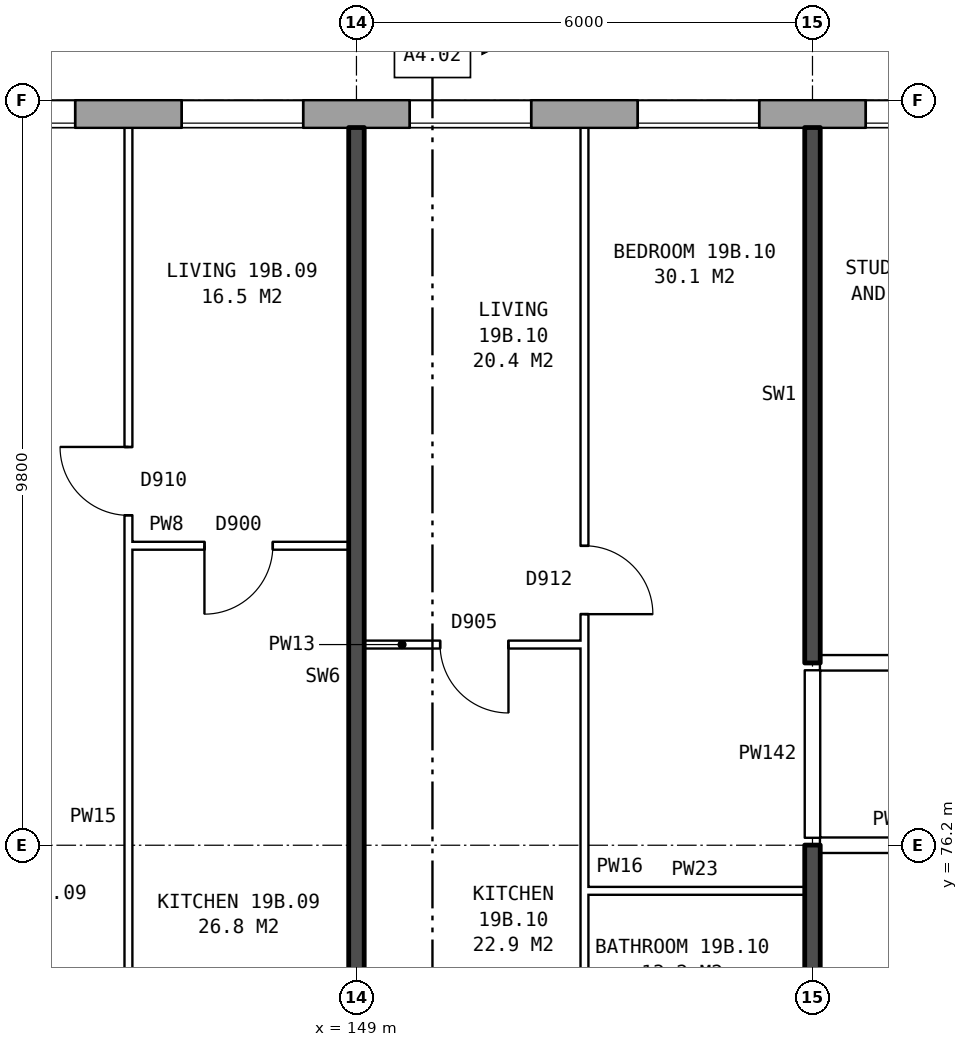
"""IFC4 building model, lengths in metres.
Left out: names, types, materials, properties, quantities, classifications, styles, units other than length and angle.
Written with IfcOpenShell. Run it as: python <this file> out.ifc"""

import sys

from ifc_helpers import new_model, si_unit, direction, frame, frame_2d, origin, place, context, subcontext, project, spatial, rectangle, extrude, element, fill, save


model = new_model("IFC4")
c1 = context("Model", 3, precision=1e-05, world=origin(), true_north=direction((0.0, 1.0)))
c2 = subcontext(c1, "Body", "Model", "MODEL_VIEW")
j1 = project(units=[si_unit("LENGTHUNIT", "METRE"), si_unit("PLANEANGLEUNIT", "RADIAN")], contexts=[c1])
p1 = place(None, origin())
s1 = spatial("IfcSite", under=j1, at=p1, CompositionType="ELEMENT")
p2 = place(p1, origin())
s2 = spatial("IfcBuilding", under=s1, at=p2, CompositionType="ELEMENT")
p3 = place(p2, frame((0.0, 0.0, 71.6)))
s3 = spatial("IfcBuildingStorey", under=s2, at=p3, CompositionType="ELEMENT", Elevation=71.6)
p4 = place(p3, frame((172.175, 85.82, 0.0), z_axis=(0.0, 0.0, 1.0), x_axis=(-1.0, 0.0, 0.0)))
e1 = element("IfcWall", 1, at=p4, inside=s3, PredefinedType="STANDARD", context=c2, shape_type="SweptSolid", body=[
    extrude(rectangle(XDim=38.101, YDim=0.36, at=frame_2d((19.05, 0.0))), origin(), (0.0, 0.0, 1.0), 2.85),
])
p5 = place(p4, frame((0.3, 0.0, 0.8)))
e2 = element("IfcOpeningElement", 2, at=p5, cuts=e1, PredefinedType="OPENING", context=c2, shape_type="SweptSolid", body=[
    extrude(rectangle(XDim=1.0, YDim=1.8, at=frame_2d((0.5, 0.9))), frame((0.0, 0.19, 0.0), z_axis=(0.0, -1.0, 0.0), x_axis=(1.0, 0.0, 0.0)), (0.0, 0.0, 1.0), 0.38),
])
p6 = place(p4, frame((5.875, 0.0, 0.8)))
e3 = element("IfcOpeningElement", 3, at=p6, cuts=e1, PredefinedType="OPENING", context=c2, shape_type="SweptSolid", body=[
    extrude(rectangle(XDim=1.6, YDim=1.8, at=frame_2d((0.8, 0.9))), frame((0.0, 0.19, 0.0), z_axis=(0.0, -1.0, 0.0), x_axis=(1.0, 0.0, 0.0)), (0.0, 0.0, 1.0), 0.38),
])
p7 = place(p4, frame((8.875, 0.0, 0.8)))
e4 = element("IfcOpeningElement", 4, at=p7, cuts=e1, PredefinedType="OPENING", context=c2, shape_type="SweptSolid", body=[
    extrude(rectangle(XDim=1.6, YDim=1.8, at=frame_2d((0.8, 0.9))), frame((0.0, 0.19, 0.0), z_axis=(0.0, -1.0, 0.0), x_axis=(1.0, 0.0, 0.0)), (0.0, 0.0, 1.0), 0.38),
])
p8 = place(p4, frame((11.875, 0.0, 0.8)))
e5 = element("IfcOpeningElement", 5, at=p8, cuts=e1, PredefinedType="OPENING", context=c2, shape_type="SweptSolid", body=[
    extrude(rectangle(XDim=1.6, YDim=1.8, at=frame_2d((0.8, 0.9))), frame((0.0, 0.19, 0.0), z_axis=(0.0, -1.0, 0.0), x_axis=(1.0, 0.0, 0.0)), (0.0, 0.0, 1.0), 0.38),
])
p9 = place(p4, frame((14.875, 0.0, 0.8)))
e6 = element("IfcOpeningElement", 6, at=p9, cuts=e1, PredefinedType="OPENING", context=c2, shape_type="SweptSolid", body=[
    extrude(rectangle(XDim=1.6, YDim=1.8, at=frame_2d((0.8, 0.9))), frame((0.0, 0.19, 0.0), z_axis=(0.0, -1.0, 0.0), x_axis=(1.0, 0.0, 0.0)), (0.0, 0.0, 1.0), 0.38),
])
p10 = place(p4, frame((17.875, 0.0, 0.8)))
e7 = element("IfcOpeningElement", 7, at=p10, cuts=e1, PredefinedType="OPENING", context=c2, shape_type="SweptSolid", body=[
    extrude(rectangle(XDim=1.6, YDim=1.8, at=frame_2d((0.8, 0.9))), frame((0.0, 0.19, 0.0), z_axis=(0.0, -1.0, 0.0), x_axis=(1.0, 0.0, 0.0)), (0.0, 0.0, 1.0), 0.38),
])
p11 = place(p4, frame((20.875, 0.0, 0.8)))
e8 = element("IfcOpeningElement", 8, at=p11, cuts=e1, PredefinedType="OPENING", context=c2, shape_type="SweptSolid", body=[
    extrude(rectangle(XDim=1.6, YDim=1.8, at=frame_2d((0.8, 0.9))), frame((0.0, 0.19, 0.0), z_axis=(0.0, -1.0, 0.0), x_axis=(1.0, 0.0, 0.0)), (0.0, 0.0, 1.0), 0.38),
])
p12 = place(p4, frame((23.875, 0.0, 0.8)))
e9 = element("IfcOpeningElement", 9, at=p12, cuts=e1, PredefinedType="OPENING", context=c2, shape_type="SweptSolid", body=[
    extrude(rectangle(XDim=1.6, YDim=1.8, at=frame_2d((0.8, 0.9))), frame((0.0, 0.19, 0.0), z_axis=(0.0, -1.0, 0.0), x_axis=(1.0, 0.0, 0.0)), (0.0, 0.0, 1.0), 0.38),
])
p13 = place(p4, frame((26.875, 0.0, 0.8)))
e10 = element("IfcOpeningElement", 10, at=p13, cuts=e1, PredefinedType="OPENING", context=c2, shape_type="SweptSolid", body=[
    extrude(rectangle(XDim=1.6, YDim=1.8, at=frame_2d((0.8, 0.9))), frame((0.0, 0.19, 0.0), z_axis=(0.0, -1.0, 0.0), x_axis=(1.0, 0.0, 0.0)), (0.0, 0.0, 1.0), 0.38),
])
p14 = place(p4, frame((29.875, 0.0, 0.8)))
e11 = element("IfcOpeningElement", 11, at=p14, cuts=e1, PredefinedType="OPENING", context=c2, shape_type="SweptSolid", body=[
    extrude(rectangle(XDim=1.6, YDim=1.8, at=frame_2d((0.8, 0.9))), frame((0.0, 0.19, 0.0), z_axis=(0.0, -1.0, 0.0), x_axis=(1.0, 0.0, 0.0)), (0.0, 0.0, 1.0), 0.38),
])
p15 = place(p4, frame((31.775, 0.0, 0.8)))
e12 = element("IfcOpeningElement", 12, at=p15, cuts=e1, PredefinedType="OPENING", context=c2, shape_type="SweptSolid", body=[
    extrude(rectangle(XDim=1.6, YDim=1.8, at=frame_2d((0.8, 0.9))), frame((0.0, 0.19, 0.0), z_axis=(0.0, -1.0, 0.0), x_axis=(1.0, 0.0, 0.0)), (0.0, 0.0, 1.0), 0.38),
])
p16 = place(p4, frame((35.775, 0.0, 1.7)))
e13 = element("IfcOpeningElement", 13, at=p16, cuts=e1, PredefinedType="OPENING", context=c2, shape_type="SweptSolid", body=[
    extrude(rectangle(XDim=0.6, YDim=0.9, at=frame_2d((0.3, 0.45))), frame((0.0, 0.19, 0.0), z_axis=(0.0, -1.0, 0.0), x_axis=(1.0, 0.0, 0.0)), (0.0, 0.0, 1.0), 0.38),
])
p17 = place(p4, frame((1.6, 0.0, 1.6)))
e14 = element("IfcOpeningElement", 14, at=p17, cuts=e1, PredefinedType="OPENING", context=c2, shape_type="SweptSolid", body=[
    extrude(rectangle(XDim=0.6, YDim=0.9, at=frame_2d((0.3, 0.45))), frame((0.0, 0.19, 0.0), z_axis=(0.0, -1.0, 0.0), x_axis=(1.0, 0.0, 0.0)), (0.0, 0.0, 1.0), 0.38),
])
p18 = place(p4, frame((3.5, 0.0, 0.8)))
e15 = element("IfcOpeningElement", 15, at=p18, cuts=e1, PredefinedType="OPENING", context=c2, shape_type="SweptSolid", body=[
    extrude(rectangle(XDim=1.4, YDim=0.9, at=frame_2d((0.7, 0.45))), frame((0.0, 0.19, 0.0), z_axis=(0.0, -1.0, 0.0), x_axis=(1.0, 0.0, 0.0)), (0.0, 0.0, 1.0), 0.38),
])
p19 = place(p4, frame((33.675, 0.0, 0.8)))
e16 = element("IfcOpeningElement", 16, at=p19, cuts=e1, PredefinedType="OPENING", context=c2, shape_type="SweptSolid", body=[
    extrude(rectangle(XDim=0.6, YDim=1.2, at=frame_2d((0.3, 0.6))), frame((0.0, 0.19, 0.0), z_axis=(0.0, -1.0, 0.0), x_axis=(1.0, 0.0, 0.0)), (0.0, 0.0, 1.0), 0.38),
])
p20 = place(p4, frame((36.675, 0.0, 0.8)))
e17 = element("IfcOpeningElement", 17, at=p20, cuts=e1, PredefinedType="OPENING", context=c2, shape_type="SweptSolid", body=[
    extrude(rectangle(XDim=1.0, YDim=1.8, at=frame_2d((0.5, 0.9))), frame((0.0, 0.19, 0.0), z_axis=(0.0, -1.0, 0.0), x_axis=(1.0, 0.0, 0.0)), (0.0, 0.0, 1.0), 0.38),
])
p21 = place(p3, frame((152.0, 75.6, 0.0), z_axis=(0.0, 0.0, 1.0), x_axis=(1.0, 0.0, 0.0)))
e18 = element("IfcWall", 18, at=p21, inside=s3, PredefinedType="PARTITIONING", context=c2, shape_type="SweptSolid", body=[
    extrude(rectangle(XDim=2.9, YDim=0.1, at=frame_2d((1.45, 0.0))), origin(), (0.0, 0.0, 1.0), 2.85),
])
p22 = place(p3, frame((155.1, 76.2, 0.0), z_axis=(0.0, 0.0, 1.0), x_axis=(1.0, 0.0, 0.0)))
e19 = element("IfcWall", 19, at=p22, inside=s3, PredefinedType="PARTITIONING", context=c2, shape_type="SweptSolid", body=[
    extrude(rectangle(XDim=2.14, YDim=0.2, at=frame_2d((1.07, 0.0))), origin(), (0.0, 0.0, 1.0), 2.85),
])
p23 = place(p3, frame((155.1, 78.6, 0.0), z_axis=(0.0, 0.0, 1.0), x_axis=(1.0, 0.0, 0.0)))
e20 = element("IfcWall", 20, at=p23, inside=s3, PredefinedType="PARTITIONING", context=c2, shape_type="SweptSolid", body=[
    extrude(rectangle(XDim=19.79, YDim=0.2, at=frame_2d((9.895, 0.0))), origin(), (0.0, 0.0, 1.0), 2.85),
])
p24 = place(p23, frame((1.45, 0.0, 0.0)))
e21 = element("IfcOpeningElement", 21, at=p24, cuts=e20, PredefinedType="OPENING", context=c2, shape_type="SweptSolid", body=[
    extrude(rectangle(XDim=1.0, YDim=2.1, at=frame_2d((0.5, 1.05))), frame((0.0, 0.11, 0.0), z_axis=(0.0, -1.0, 0.0), x_axis=(1.0, 0.0, 0.0)), (0.0, 0.0, 1.0), 0.22),
])
p25 = place(p23, frame((9.6, 0.0, 0.0)))
e22 = element("IfcOpeningElement", 22, at=p25, cuts=e20, PredefinedType="OPENING", context=c2, shape_type="SweptSolid", body=[
    extrude(rectangle(XDim=1.0, YDim=2.1, at=frame_2d((0.5, 1.05))), frame((0.0, 0.11, 0.0), z_axis=(0.0, -1.0, 0.0), x_axis=(1.0, 0.0, 0.0)), (0.0, 0.0, 1.0), 0.22),
])
p26 = place(p23, frame((13.2, 0.0, 0.0)))
e23 = element("IfcOpeningElement", 23, at=p26, cuts=e20, PredefinedType="OPENING", context=c2, shape_type="SweptSolid", body=[
    extrude(rectangle(XDim=1.0, YDim=2.1, at=frame_2d((0.5, 1.05))), frame((0.0, 0.11, 0.0), z_axis=(0.0, -1.0, 0.0), x_axis=(1.0, 0.0, 0.0)), (0.0, 0.0, 1.0), 0.22),
])
p27 = place(p3, frame((149.1, 78.84, 0.0), z_axis=(0.0, 0.0, 1.0), x_axis=(1.0, 0.0, 0.0)))
e24 = element("IfcWall", 24, at=p27, inside=s3, PredefinedType="PARTITIONING", context=c2, shape_type="SweptSolid", body=[
    extrude(rectangle(XDim=2.9, YDim=0.1, at=frame_2d((1.45, 0.0))), origin(), (0.0, 0.0, 1.0), 2.85),
])
p28 = place(p27, frame((1.0, 0.0, 0.0)))
e25 = element("IfcOpeningElement", 25, at=p28, cuts=e24, PredefinedType="OPENING", context=c2, shape_type="SweptSolid", body=[
    extrude(rectangle(XDim=0.9, YDim=2.1, at=frame_2d((0.45, 1.05))), frame((0.0, 0.06, 0.0), z_axis=(0.0, -1.0, 0.0), x_axis=(1.0, 0.0, 0.0)), (0.0, 0.0, 1.0), 0.12),
])
p29 = place(p3, frame((146.0, 80.14, 0.0), z_axis=(0.0, 0.0, 1.0), x_axis=(1.0, 0.0, 0.0)))
e26 = element("IfcWall", 26, at=p29, inside=s3, PredefinedType="PARTITIONING", context=c2, shape_type="SweptSolid", body=[
    extrude(rectangle(XDim=2.9, YDim=0.1, at=frame_2d((1.45, 0.0))), origin(), (0.0, 0.0, 1.0), 2.85),
])
p30 = place(p29, frame((1.0, 0.0, 0.0)))
e27 = element("IfcOpeningElement", 27, at=p30, cuts=e26, PredefinedType="OPENING", context=c2, shape_type="SweptSolid", body=[
    extrude(rectangle(XDim=0.9, YDim=2.1, at=frame_2d((0.45, 1.05))), frame((0.0, 0.06, 0.0), z_axis=(0.0, -1.0, 0.0), x_axis=(1.0, 0.0, 0.0)), (0.0, 0.0, 1.0), 0.12),
])
p31 = place(p3, frame((146.0, 71.3, 0.0), z_axis=(0.0, 0.0, 1.0), x_axis=(0.0, 1.0, 0.0)))
e28 = element("IfcWall", 28, at=p31, inside=s3, PredefinedType="PARTITIONING", context=c2, shape_type="SweptSolid", body=[
    extrude(rectangle(XDim=14.34, YDim=0.1, at=frame_2d((7.17, 0.0))), origin(), (0.0, 0.0, 1.0), 2.85),
])
p32 = place(p31, frame((9.24, 0.0, 0.0)))
e29 = element("IfcOpeningElement", 29, at=p32, cuts=e28, PredefinedType="OPENING", context=c2, shape_type="SweptSolid", body=[
    extrude(rectangle(XDim=0.9, YDim=2.1, at=frame_2d((0.45, 1.05))), frame((0.0, 0.06, 0.0), z_axis=(0.0, -1.0, 0.0), x_axis=(1.0, 0.0, 0.0)), (0.0, 0.0, 1.0), 0.12),
])
p33 = place(p31, frame((0.4, 0.0, 0.0)))
e30 = element("IfcOpeningElement", 30, at=p33, cuts=e28, PredefinedType="OPENING", context=c2, shape_type="SweptSolid", body=[
    extrude(rectangle(XDim=0.9, YDim=2.1, at=frame_2d((0.45, 1.05))), frame((0.0, 0.06, 0.0), z_axis=(0.0, -1.0, 0.0), x_axis=(1.0, 0.0, 0.0)), (0.0, 0.0, 1.0), 0.12),
])
p34 = place(p3, frame((149.0, 71.2, 0.0), z_axis=(0.0, 0.0, 1.0), x_axis=(0.0, 1.0, 0.0)))
e31 = element("IfcWall", 31, at=p34, inside=s3, PredefinedType="SOLIDWALL", context=c2, shape_type="SweptSolid", body=[
    extrude(rectangle(XDim=14.44, YDim=0.2, at=frame_2d((7.22, 0.0))), origin(), (0.0, 0.0, 1.0), 2.85),
])
p35 = place(p3, frame((152.0, 71.3, 0.0), z_axis=(0.0, 0.0, 1.0), x_axis=(0.0, 1.0, 0.0)))
e32 = element("IfcWall", 32, at=p35, inside=s3, PredefinedType="PARTITIONING", context=c2, shape_type="SweptSolid", body=[
    extrude(rectangle(XDim=14.34, YDim=0.1, at=frame_2d((7.17, 0.0))), origin(), (0.0, 0.0, 1.0), 2.85),
])
p36 = place(p35, frame((7.94, 0.0, 0.0)))
e33 = element("IfcOpeningElement", 33, at=p36, cuts=e32, PredefinedType="OPENING", context=c2, shape_type="SweptSolid", body=[
    extrude(rectangle(XDim=0.9, YDim=2.1, at=frame_2d((0.45, 1.05))), frame((0.0, 0.06, 0.0), z_axis=(0.0, -1.0, 0.0), x_axis=(1.0, 0.0, 0.0)), (0.0, 0.0, 1.0), 0.12),
])
p37 = place(p35, frame((0.4, 0.0, 0.0)))
e34 = element("IfcOpeningElement", 34, at=p37, cuts=e32, PredefinedType="OPENING", context=c2, shape_type="SweptSolid", body=[
    extrude(rectangle(XDim=0.9, YDim=2.1, at=frame_2d((0.45, 1.05))), frame((0.0, 0.06, 0.0), z_axis=(0.0, -1.0, 0.0), x_axis=(1.0, 0.0, 0.0)), (0.0, 0.0, 1.0), 0.12),
])
p38 = place(p3, frame((155.0, 71.2, 0.0), z_axis=(0.0, 0.0, 1.0), x_axis=(0.0, 1.0, 0.0)))
e35 = element("IfcWall", 35, at=p38, inside=s3, PredefinedType="SOLIDWALL", context=c2, shape_type="SweptSolid", body=[
    extrude(rectangle(XDim=5.0, YDim=0.2, at=frame_2d((2.5, 0.0))), origin(), (0.0, 0.0, 1.0), 2.85),
])
p39 = place(p3, frame((155.0, 76.3, 0.0), z_axis=(0.0, 0.0, 1.0), x_axis=(0.0, 1.0, 0.0)))
e36 = element("IfcWall", 36, at=p39, inside=s3, PredefinedType="PARTITIONING", context=c2, shape_type="SweptSolid", body=[
    extrude(rectangle(XDim=2.2, YDim=0.2, at=frame_2d((1.1, 0.0))), origin(), (0.0, 0.0, 1.0), 2.85),
])
p40 = place(p3, frame((155.0, 78.6, 0.0), z_axis=(0.0, 0.0, 1.0), x_axis=(0.0, 1.0, 0.0)))
e37 = element("IfcWall", 37, at=p40, inside=s3, PredefinedType="SOLIDWALL", context=c2, shape_type="SweptSolid", body=[
    extrude(rectangle(XDim=7.04, YDim=0.2, at=frame_2d((3.52, 0.0))), origin(), (0.0, 0.0, 1.0), 2.85),
])
p41 = place(p9, origin())
e38 = element("IfcWindow", 38, at=p41, inside=s3, PartitioningType="SINGLE_PANEL", PredefinedType="WINDOW", context=c2, shape_type="SweptSolid", body=[
    extrude(rectangle(XDim=1.6, YDim=1.8, at=frame_2d((0.8, 0.9))), frame((0.0, 0.15, 0.0), z_axis=(0.0, -1.0, 0.0), x_axis=(1.0, 0.0, 0.0)), (0.0, 0.0, 1.0), 0.06),
])
fill(e6, e38)
p42 = place(p10, origin())
e39 = element("IfcWindow", 39, at=p42, inside=s3, PartitioningType="SINGLE_PANEL", PredefinedType="WINDOW", context=c2, shape_type="SweptSolid", body=[
    extrude(rectangle(XDim=1.6, YDim=1.8, at=frame_2d((0.8, 0.9))), frame((0.0, 0.15, 0.0), z_axis=(0.0, -1.0, 0.0), x_axis=(1.0, 0.0, 0.0)), (0.0, 0.0, 1.0), 0.06),
])
fill(e7, e39)
p43 = place(p11, origin())
e40 = element("IfcWindow", 40, at=p43, inside=s3, PartitioningType="SINGLE_PANEL", PredefinedType="WINDOW", context=c2, shape_type="SweptSolid", body=[
    extrude(rectangle(XDim=1.6, YDim=1.8, at=frame_2d((0.8, 0.9))), frame((0.0, 0.15, 0.0), z_axis=(0.0, -1.0, 0.0), x_axis=(1.0, 0.0, 0.0)), (0.0, 0.0, 1.0), 0.06),
])
fill(e8, e40)
p44 = place(p12, origin())
e41 = element("IfcWindow", 41, at=p44, inside=s3, PartitioningType="SINGLE_PANEL", PredefinedType="WINDOW", context=c2, shape_type="SweptSolid", body=[
    extrude(rectangle(XDim=1.6, YDim=1.8, at=frame_2d((0.8, 0.9))), frame((0.0, 0.15, 0.0), z_axis=(0.0, -1.0, 0.0), x_axis=(1.0, 0.0, 0.0)), (0.0, 0.0, 1.0), 0.06),
])
fill(e9, e41)
p45 = place(p13, origin())
e42 = element("IfcWindow", 42, at=p45, inside=s3, PartitioningType="SINGLE_PANEL", PredefinedType="WINDOW", context=c2, shape_type="SweptSolid", body=[
    extrude(rectangle(XDim=1.6, YDim=1.8, at=frame_2d((0.8, 0.9))), frame((0.0, 0.15, 0.0), z_axis=(0.0, -1.0, 0.0), x_axis=(1.0, 0.0, 0.0)), (0.0, 0.0, 1.0), 0.06),
])
fill(e10, e42)
p46 = place(p32, origin())
e43 = element("IfcDoor", 43, at=p46, inside=s3, OperationType="SINGLE_SWING_RIGHT", PredefinedType="DOOR", context=c2, shape_type="SweptSolid", body=[
    extrude(rectangle(XDim=0.9, YDim=2.1, at=frame_2d((0.45, 1.05))), frame((0.0, 0.025, 0.0), z_axis=(0.0, -1.0, 0.0), x_axis=(1.0, 0.0, 0.0)), (0.0, 0.0, 1.0), 0.05),
])
fill(e29, e43)
p47 = place(p30, frame((0.9, 0.0, 0.0), z_axis=(0.0, 0.0, 1.0), x_axis=(-1.0, 0.0, 0.0)))
e44 = element("IfcDoor", 44, at=p47, inside=s3, OperationType="SINGLE_SWING_RIGHT", PredefinedType="DOOR", context=c2, shape_type="SweptSolid", body=[
    extrude(rectangle(XDim=0.9, YDim=2.1, at=frame_2d((0.45, 1.05))), frame((0.0, 0.025, 0.0), z_axis=(0.0, -1.0, 0.0), x_axis=(1.0, 0.0, 0.0)), (0.0, 0.0, 1.0), 0.05),
])
fill(e27, e44)
p48 = place(p36, frame((0.9, 0.0, 0.0), z_axis=(0.0, 0.0, 1.0), x_axis=(-1.0, 0.0, 0.0)))
e45 = element("IfcDoor", 45, at=p48, inside=s3, OperationType="SINGLE_SWING_RIGHT", PredefinedType="DOOR", context=c2, shape_type="SweptSolid", body=[
    extrude(rectangle(XDim=0.9, YDim=2.1, at=frame_2d((0.45, 1.05))), frame((0.0, 0.025, 0.0), z_axis=(0.0, -1.0, 0.0), x_axis=(1.0, 0.0, 0.0)), (0.0, 0.0, 1.0), 0.05),
])
fill(e33, e45)
p49 = place(p28, frame((0.9, 0.0, 0.0), z_axis=(0.0, 0.0, 1.0), x_axis=(-1.0, 0.0, 0.0)))
e46 = element("IfcDoor", 46, at=p49, inside=s3, OperationType="SINGLE_SWING_LEFT", PredefinedType="DOOR", context=c2, shape_type="SweptSolid", body=[
    extrude(rectangle(XDim=0.9, YDim=2.1, at=frame_2d((0.45, 1.05))), frame((0.0, 0.025, 0.0), z_axis=(0.0, -1.0, 0.0), x_axis=(1.0, 0.0, 0.0)), (0.0, 0.0, 1.0), 0.05),
])
fill(e25, e46)
save(model, sys.argv[1])
